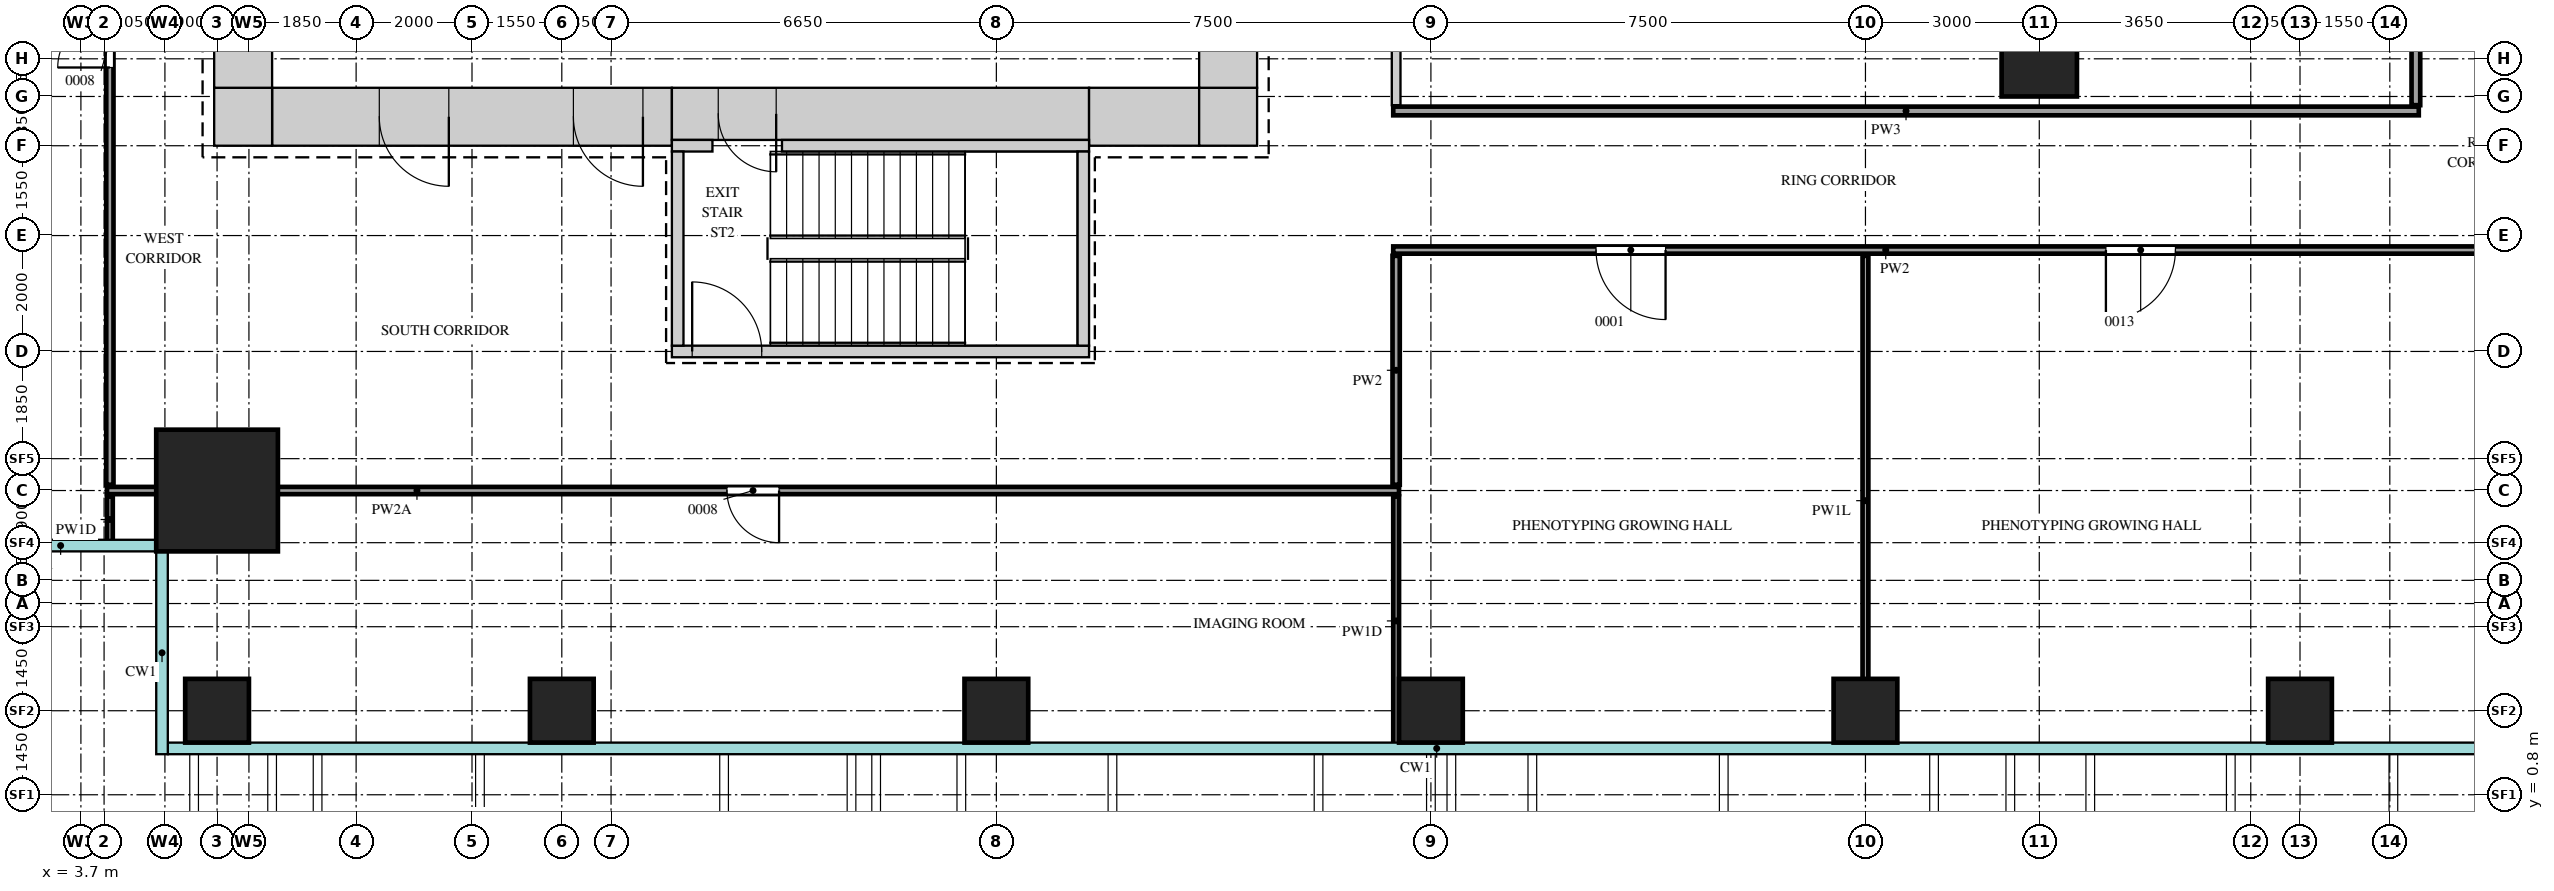
"""IFC4 building model, lengths in metres.
Left out: names, types, materials, properties, quantities, classifications, styles, units other than length and angle.
Written with IfcOpenShell. Run it as: python <this file> out.ifc"""

import sys

from ifc_helpers import new_model, si_unit, direction, frame, frame_2d, origin, origin_2d, place, context, subcontext, project, spatial, rectangle, extrude, source, transform, mapped, element, fill, save


model = new_model("IFC4")
c1 = context("Model", 3, precision=1e-05, world=origin(), true_north=direction((0.0, 1.0)))
c2 = subcontext(c1, "Body", "Model", "MODEL_VIEW")
j1 = project(units=[si_unit("LENGTHUNIT", "METRE"), si_unit("PLANEANGLEUNIT", "RADIAN")], contexts=[c1])
p1 = place(None, origin())
s1 = spatial("IfcSite", under=j1, at=p1, CompositionType="ELEMENT")
p2 = place(p1, origin())
s2 = spatial("IfcBuilding", under=s1, at=p2, CompositionType="ELEMENT")
p3 = place(p2, frame((0.0, 0.0, 127.9)))
s3 = spatial("IfcBuildingStorey", under=s2, at=p3, CompositionType="ELEMENT", Elevation=127.9)
m1 = source(origin(), c2, "Body", "SweptSolid", [
    extrude(rectangle(XDim=6.9, YDim=1.0, at=frame_2d((3.45, 0.0))), origin(), (0.0, 0.0, 1.0), 4.1),
])
p4 = place(p3, frame((7.0, 12.5, 0.0), z_axis=(0.0, 0.0, 1.0), x_axis=(1.0, 0.0, 0.0)))
e1 = element("IfcWall", 1, at=p4, inside=s3, PredefinedType="SHEAR", context=c2, shape_type="MappedRepresentation", body=[
    mapped(m1, transform((0.0, 0.0, 0.0))),
])
m2 = source(origin(), c2, "Body", "SweptSolid", [
    extrude(rectangle(XDim=1.2, YDim=2.1, at=frame_2d((0.6, 1.05))), frame((0.0, 0.51, 0.0), z_axis=(0.0, -1.0, 0.0), x_axis=(1.0, 0.0, 0.0)), (0.0, 0.0, 1.0), 1.02),
])
p5 = place(p4, frame((5.2, 0.0, 0.0)))
e2 = element("IfcOpeningElement", 2, at=p5, cuts=e1, PredefinedType="OPENING", context=c2, shape_type="MappedRepresentation", body=[
    mapped(m2, transform((0.0, 0.0, 0.0))),
])
p6 = place(p4, frame((1.85, 0.0, 0.0)))
e3 = element("IfcOpeningElement", 3, at=p6, cuts=e1, PredefinedType="OPENING", context=c2, shape_type="MappedRepresentation", body=[
    mapped(m2, transform((0.0, 0.0, 0.0))),
])
m3 = source(origin(), c2, "Body", "SweptSolid", [
    extrude(rectangle(XDim=7.2, YDim=0.9, at=frame_2d((3.6, 0.0))), origin(), (0.0, 0.0, 1.0), 4.1),
])
p7 = place(p3, frame((13.9, 12.55, 0.0), z_axis=(0.0, 0.0, 1.0), x_axis=(1.0, 0.0, 0.0)))
e4 = element("IfcWall", 4, at=p7, inside=s3, PredefinedType="SHEAR", context=c2, shape_type="MappedRepresentation", body=[
    mapped(m3, transform((0.0, 0.0, 0.0))),
])
m4 = source(origin(), c2, "Body", "SweptSolid", [
    extrude(rectangle(XDim=1.0, YDim=2.1, at=frame_2d((0.5, 1.05))), frame((0.0, 0.46, 0.0), z_axis=(0.0, -1.0, 0.0), x_axis=(1.0, 0.0, 0.0)), (0.0, 0.0, 1.0), 0.92),
])
p8 = place(p7, frame((0.8, 0.0, 0.0)))
e5 = element("IfcOpeningElement", 5, at=p8, cuts=e4, PredefinedType="OPENING", context=c2, shape_type="MappedRepresentation", body=[
    mapped(m4, transform((0.0, 0.0, 0.0))),
])
m5 = source(origin(), c2, "Body", "SweptSolid", [
    extrude(rectangle(XDim=1.9, YDim=1.0, at=frame_2d((0.95, 0.0))), origin(), (0.0, 0.0, 1.0), 4.1),
])
p9 = place(p3, frame((21.1, 12.5, 0.0), z_axis=(0.0, 0.0, 1.0), x_axis=(1.0, 0.0, 0.0)))
e6 = element("IfcWall", 6, at=p9, inside=s3, PredefinedType="SHEAR", context=c2, shape_type="MappedRepresentation", body=[
    mapped(m5, transform((0.0, 0.0, 0.0))),
])
m6 = source(origin(), c2, "Body", "SweptSolid", [
    extrude(rectangle(XDim=1.0, YDim=1.0, at=frame_2d((0.5, 0.0))), origin(), (0.0, 0.0, 1.0), 4.1),
])
for number, where, z_axis, x_axis in (
    (7, (23.0, 12.5, 0.0), (0.0, 0.0, 1.0), (1.0, 0.0, 0.0)),
    (8, (6.0, 12.5, 0.0), (0.0, 0.0, 1.0), (1.0, 0.0, 0.0)),
):
    element("IfcWall", number, at=place(p3, frame(where, z_axis=z_axis, x_axis=x_axis)), inside=s3, PredefinedType="SHEAR", context=c2, shape_type="MappedRepresentation", body=[
        mapped(m6, transform((0.0, 0.0, 0.0))),
    ])
m7 = source(origin(), c2, "Body", "SweptSolid", [
    extrude(rectangle(XDim=28.0, YDim=1.0, at=frame_2d((14.0, 0.0))), origin(), (0.0, 0.0, 1.0), 4.1),
])
p10 = place(p3, frame((23.5, 13.0, 0.0), z_axis=(0.0, 0.0, 1.0), x_axis=(0.0, 1.0, 0.0)))
e9 = element("IfcWall", 9, at=p10, inside=s3, PredefinedType="SHEAR", context=c2, shape_type="MappedRepresentation", body=[
    mapped(m7, transform((0.0, 0.0, 0.0))),
])
m8 = source(origin(), c2, "Body", "SweptSolid", [
    extrude(rectangle(XDim=1.8, YDim=2.1, at=frame_2d((0.9, 1.05))), frame((0.0, 0.51, 0.0), z_axis=(0.0, -1.0, 0.0), x_axis=(1.0, 0.0, 0.0)), (0.0, 0.0, 1.0), 1.02),
])
p11 = place(p10, frame((22.6, 0.0, 0.0)))
e10 = element("IfcOpeningElement", 10, at=p11, cuts=e9, PredefinedType="OPENING", context=c2, shape_type="MappedRepresentation", body=[
    mapped(m8, transform((0.0, 0.0, 0.0))),
])
p12 = place(p10, frame((15.35, 0.0, 0.0)))
e11 = element("IfcOpeningElement", 11, at=p12, cuts=e9, PredefinedType="OPENING", context=c2, shape_type="MappedRepresentation", body=[
    mapped(m2, transform((0.0, 0.0, 0.0))),
])
m9 = source(origin(), c2, "Body", "SweptSolid", [
    extrude(rectangle(XDim=0.9, YDim=2.1, at=frame_2d((0.45, 1.05))), frame((0.0, 0.51, 0.0), z_axis=(0.0, -1.0, 0.0), x_axis=(1.0, 0.0, 0.0)), (0.0, 0.0, 1.0), 1.02),
])
p13 = place(p10, frame((1.35, 0.0, 0.0)))
e12 = element("IfcOpeningElement", 12, at=p13, cuts=e9, PredefinedType="OPENING", context=c2, shape_type="MappedRepresentation", body=[
    mapped(m9, transform((0.0, 0.0, 0.0))),
])
p14 = place(p10, frame((4.55, 0.0, 0.0)))
e13 = element("IfcOpeningElement", 13, at=p14, cuts=e9, PredefinedType="OPENING", context=c2, shape_type="MappedRepresentation", body=[
    mapped(m9, transform((0.0, 0.0, 0.0))),
])
p15 = place(p10, frame((7.8, 0.0, 0.0)))
e14 = element("IfcOpeningElement", 14, at=p15, cuts=e9, PredefinedType="OPENING", context=c2, shape_type="MappedRepresentation", body=[
    mapped(m9, transform((0.0, 0.0, 0.0))),
])
p16 = place(p3, frame((6.5, 13.0, 0.0), z_axis=(0.0, 0.0, 1.0), x_axis=(0.0, 1.0, 0.0)))
e15 = element("IfcWall", 15, at=p16, inside=s3, PredefinedType="SHEAR", context=c2, shape_type="MappedRepresentation", body=[
    mapped(m7, transform((0.0, 0.0, 0.0))),
])
m10 = source(origin(), c2, "Body", "SweptSolid", [
    extrude(rectangle(XDim=0.7, YDim=0.2, at=frame_2d((0.35, 0.0))), origin(), (0.0, 0.0, 1.0), 4.1),
])
p17 = place(p3, frame((13.9, 12.0, 0.0), z_axis=(0.0, 0.0, 1.0), x_axis=(1.0, 0.0, 0.0)))
e16 = element("IfcWall", 16, at=p17, inside=s3, PredefinedType="SHEAR", context=c2, shape_type="MappedRepresentation", body=[
    mapped(m10, transform((0.0, 0.0, 0.0))),
])
m11 = source(origin(), c2, "Body", "SweptSolid", [
    extrude(rectangle(XDim=5.3, YDim=0.2, at=frame_2d((2.65, 0.0))), origin(), (0.0, 0.0, 1.0), 4.1),
])
p18 = place(p3, frame((15.8, 12.0, 0.0), z_axis=(0.0, 0.0, 1.0), x_axis=(1.0, 0.0, 0.0)))
e17 = element("IfcWall", 17, at=p18, inside=s3, PredefinedType="SHEAR", context=c2, shape_type="MappedRepresentation", body=[
    mapped(m11, transform((0.0, 0.0, 0.0))),
])
m12 = source(origin(), c2, "Body", "SweptSolid", [
    extrude(rectangle(XDim=7.2, YDim=0.2, at=frame_2d((3.6, 0.0))), origin(), (0.0, 0.0, 1.0), 4.1),
])
p19 = place(p3, frame((13.9, 8.45, 0.0), z_axis=(0.0, 0.0, 1.0), x_axis=(1.0, 0.0, 0.0)))
e18 = element("IfcWall", 18, at=p19, inside=s3, PredefinedType="SHEAR", context=c2, shape_type="MappedRepresentation", body=[
    mapped(m12, transform((0.0, 0.0, 0.0))),
])
m13 = source(origin(), c2, "Body", "SweptSolid", [
    extrude(rectangle(XDim=1.2, YDim=2.1, at=frame_2d((0.6, 1.05))), frame((0.0, 0.11, 0.0), z_axis=(0.0, -1.0, 0.0), x_axis=(1.0, 0.0, 0.0)), (0.0, 0.0, 1.0), 0.22),
])
p20 = place(p19, frame((0.35, 0.0, 0.0)))
e19 = element("IfcOpeningElement", 19, at=p20, cuts=e18, PredefinedType="OPENING", context=c2, shape_type="MappedRepresentation", body=[
    mapped(m13, transform((0.0, 0.0, 0.0))),
])
m14 = source(origin(), c2, "Body", "SweptSolid", [
    extrude(rectangle(XDim=3.35, YDim=0.2, at=frame_2d((1.675, 0.0))), origin(), (0.0, 0.0, 1.0), 4.1),
])
for number, where, z_axis, x_axis in (
    (20, (21.0, 8.55, 0.0), (0.0, 0.0, 1.0), (0.0, 1.0, 0.0)),
    (21, (14.0, 8.55, 0.0), (0.0, 0.0, 1.0), (0.0, 1.0, 0.0)),
):
    element("IfcWall", number, at=place(p3, frame(where, z_axis=z_axis, x_axis=x_axis)), inside=s3, PredefinedType="SHEAR", context=c2, shape_type="MappedRepresentation", body=[
        mapped(m14, transform((0.0, 0.0, 0.0))),
    ])
m15 = source(origin(), c2, "Body", "SweptSolid", [
    extrude(rectangle(XDim=2.1, YDim=2.1, at=origin_2d()), origin(), (0.0, 0.0, 1.0), 4.4),
])
p21 = place(p3, frame((6.05, 6.05, 0.0), z_axis=(0.0, 0.0, 1.0), x_axis=(1.0, 0.0, 0.0)))
e22 = element("IfcColumn", 22, at=p21, inside=s3, PredefinedType="COLUMN", context=c2, shape_type="MappedRepresentation", body=[
    mapped(m15, transform((0.0, 0.0, 0.0))),
])
m16 = source(origin(), c2, "Body", "SweptSolid", [
    extrude(rectangle(XDim=1.1, YDim=1.1, at=origin_2d()), origin(), (0.0, 0.0, 1.0), 4.1),
])
for number, where, z_axis, x_axis in (
    (23, (6.05, 2.25, 0.0), (0.0, 0.0, 1.0), (1.0, 0.0, 0.0)),
    (24, (12.0, 2.25, 0.0), (0.0, 0.0, 1.0), (1.0, 0.0, 0.0)),
    (25, (19.5, 2.25, 0.0), (0.0, 0.0, 1.0), (1.0, 0.0, 0.0)),
    (26, (27.0, 2.25, 0.0), (0.0, 0.0, 1.0), (1.0, 0.0, 0.0)),
    (27, (34.5, 2.25, 0.0), (0.0, 0.0, 1.0), (1.0, 0.0, 0.0)),
    (28, (42.0, 2.25, 0.0), (0.0, 0.0, 1.0), (1.0, 0.0, 0.0)),
):
    element("IfcColumn", number, at=place(p3, frame(where, z_axis=z_axis, x_axis=x_axis)), inside=s3, PredefinedType="COLUMN", context=c2, shape_type="MappedRepresentation", body=[
        mapped(m16, transform((0.0, 0.0, 0.0))),
    ])
m17 = source(origin(), c2, "Body", "SweptSolid", [
    extrude(rectangle(XDim=1.3, YDim=1.3, at=origin_2d()), origin(), (0.0, 0.0, 1.0), 4.1),
])
p22 = place(p3, frame((37.5, 13.5, 0.0), z_axis=(0.0, 0.0, 1.0), x_axis=(1.0, 0.0, 0.0)))
e29 = element("IfcColumn", 29, at=p22, inside=s3, PredefinedType="COLUMN", context=c2, shape_type="MappedRepresentation", body=[
    mapped(m17, transform((0.0, 0.0, 0.0))),
])
m18 = source(origin(), c2, "Body", "SweptSolid", [
    extrude(rectangle(XDim=4.3, YDim=0.1, at=frame_2d((2.15, 0.0))), origin(), (0.0, 0.0, 1.0), 4.2),
])
p23 = place(p3, frame((26.4, 1.65, 0.0), z_axis=(0.0, 0.0, 1.0), x_axis=(0.0, 1.0, 0.0)))
e30 = element("IfcWall", 30, at=p23, inside=s3, PredefinedType="PARTITIONING", context=c2, shape_type="MappedRepresentation", body=[
    mapped(m18, transform((0.0, 0.0, 0.0))),
])
m19 = source(origin(), c2, "Body", "SweptSolid", [
    extrude(rectangle(XDim=8.45, YDim=0.1, at=frame_2d((4.225, 0.0))), origin(), (0.0, 0.0, 1.0), 3.6),
])
p24 = place(p3, frame((34.5, 1.65, 0.0), z_axis=(0.0, 0.0, 1.0), x_axis=(0.0, 1.0, 0.0)))
e31 = element("IfcWall", 31, at=p24, inside=s3, PredefinedType="PARTITIONING", context=c2, shape_type="MappedRepresentation", body=[
    mapped(m19, transform((0.0, 0.0, 0.0))),
])
m20 = source(origin(), c2, "Body", "SweptSolid", [
    extrude(rectangle(XDim=0.8, YDim=0.1, at=frame_2d((0.4, 0.0))), origin(), (0.0, 0.0, 1.0), 4.2),
])
p25 = place(p3, frame((4.2, 5.15, 0.0), z_axis=(0.0, 0.0, 1.0), x_axis=(0.0, 1.0, 0.0)))
e32 = element("IfcWall", 32, at=p25, inside=s3, PredefinedType="PARTITIONING", context=c2, shape_type="MappedRepresentation", body=[
    mapped(m20, transform((0.0, 0.0, 0.0))),
])
m21 = source(origin(), c2, "Body", "SweptSolid", [
    extrude(rectangle(XDim=22.3, YDim=0.125, at=frame_2d((11.15, 0.0))), origin(), (0.0, 0.0, 1.0), 3.55),
])
p26 = place(p3, frame((4.15, 6.05, 0.0), z_axis=(0.0, 0.0, 1.0), x_axis=(1.0, 0.0, 0.0)))
e33 = element("IfcWall", 33, at=p26, inside=s3, PredefinedType="PARTITIONING", context=c2, shape_type="MappedRepresentation", body=[
    mapped(m21, transform((0.0, 0.0, 0.0))),
])
m22 = source(origin(), c2, "Body", "SweptSolid", [
    extrude(rectangle(XDim=0.9, YDim=2.1, at=frame_2d((0.45, 1.05))), frame((0.0, 0.073, 0.0), z_axis=(0.0, -1.0, 0.0), x_axis=(1.0, 0.0, 0.0)), (0.0, 0.0, 1.0), 0.145),
])
p27 = place(p26, frame((10.7, 0.0, 0.0)))
e34 = element("IfcOpeningElement", 34, at=p27, cuts=e33, PredefinedType="OPENING", context=c2, shape_type="MappedRepresentation", body=[
    mapped(m22, transform((0.0, 0.0, 0.0))),
])
m23 = source(origin(), c2, "Body", "SweptSolid", [
    extrude(rectangle(XDim=21.15, YDim=0.125, at=frame_2d((10.575, 0.0))), origin(), (0.0, 0.0, 1.0), 4.2),
])
p28 = place(p3, frame((4.2, 6.15, 0.0), z_axis=(0.0, 0.0, 1.0), x_axis=(0.0, 1.0, 0.0)))
e35 = element("IfcWall", 35, at=p28, inside=s3, PredefinedType="PARTITIONING", context=c2, shape_type="MappedRepresentation", body=[
    mapped(m23, transform((0.0, 0.0, 0.0))),
])
p29 = place(p28, frame((7.2, 0.0, 0.0)))
e36 = element("IfcOpeningElement", 36, at=p29, cuts=e35, PredefinedType="OPENING", context=c2, shape_type="MappedRepresentation", body=[
    mapped(m22, transform((0.0, 0.0, 0.0))),
])
p30 = place(p28, frame((16.8, 0.0, 0.0)))
e37 = element("IfcOpeningElement", 37, at=p30, cuts=e35, PredefinedType="OPENING", context=c2, shape_type="MappedRepresentation", body=[
    mapped(m22, transform((0.0, 0.0, 0.0))),
])
m24 = source(origin(), c2, "Body", "SweptSolid", [
    extrude(rectangle(XDim=3.95, YDim=0.125, at=frame_2d((1.975, 0.0))), origin(), (0.0, 0.0, 1.0), 4.2),
])
p31 = place(p3, frame((26.4, 6.15, 0.0), z_axis=(0.0, 0.0, 1.0), x_axis=(0.0, 1.0, 0.0)))
e38 = element("IfcWall", 38, at=p31, inside=s3, PredefinedType="PARTITIONING", context=c2, shape_type="MappedRepresentation", body=[
    mapped(m24, transform((0.0, 0.0, 0.0))),
])
m25 = source(origin(), c2, "Body", "SweptSolid", [
    extrude(rectangle(XDim=20.0, YDim=0.125, at=frame_2d((10.0, 0.0))), origin(), (0.0, 0.0, 1.0), 4.2),
])
p32 = place(p3, frame((26.35, 10.2, 0.0), z_axis=(0.0, 0.0, 1.0), x_axis=(1.0, 0.0, 0.0)))
e39 = element("IfcWall", 39, at=p32, inside=s3, PredefinedType="PARTITIONING", context=c2, shape_type="MappedRepresentation", body=[
    mapped(m25, transform((0.0, 0.0, 0.0))),
])
m26 = source(origin(), c2, "Body", "SweptSolid", [
    extrude(rectangle(XDim=1.2, YDim=2.1, at=frame_2d((0.6, 1.05))), frame((0.0, 0.073, 0.0), z_axis=(0.0, -1.0, 0.0), x_axis=(1.0, 0.0, 0.0)), (0.0, 0.0, 1.0), 0.145),
])
p33 = place(p32, frame((3.5, 0.0, 0.0)))
e40 = element("IfcOpeningElement", 40, at=p33, cuts=e39, PredefinedType="OPENING", context=c2, shape_type="MappedRepresentation", body=[
    mapped(m26, transform((0.0, 0.0, 0.0))),
])
p34 = place(p32, frame((12.3, 0.0, 0.0)))
e41 = element("IfcOpeningElement", 41, at=p34, cuts=e39, PredefinedType="OPENING", context=c2, shape_type="MappedRepresentation", body=[
    mapped(m26, transform((0.0, 0.0, 0.0))),
])
m27 = source(origin(), c2, "Body", "SweptSolid", [
    extrude(rectangle(XDim=17.7, YDim=0.15, at=frame_2d((8.85, 0.0))), origin(), (0.0, 0.0, 1.0), 4.2),
])
p35 = place(p3, frame((26.35, 12.6, 0.0), z_axis=(0.0, 0.0, 1.0), x_axis=(1.0, 0.0, 0.0)))
e42 = element("IfcWall", 42, at=p35, inside=s3, PredefinedType="PARTITIONING", context=c2, shape_type="MappedRepresentation", body=[
    mapped(m27, transform((0.0, 0.0, 0.0))),
])
m28 = source(origin(), c2, "Body", "SweptSolid", [
    extrude(rectangle(XDim=5.2, YDim=0.15, at=frame_2d((2.6, 0.0))), origin(), (0.0, 0.0, 1.0), 4.2),
])
p36 = place(p3, frame((26.4, 12.7, 0.0), z_axis=(0.0, 0.0, 1.0), x_axis=(0.0, 1.0, 0.0)))
e43 = element("IfcWall", 43, at=p36, inside=s3, PredefinedType="PARTITIONING", context=c2, shape_type="MappedRepresentation", body=[
    mapped(m28, transform((0.0, 0.0, 0.0))),
])
m29 = source(origin(), c2, "Body", "SweptSolid", [
    extrude(rectangle(XDim=0.9, YDim=2.1, at=frame_2d((0.45, 1.05))), frame((0.0, 0.085, 0.0), z_axis=(0.0, -1.0, 0.0), x_axis=(1.0, 0.0, 0.0)), (0.0, 0.0, 1.0), 0.17),
])
p37 = place(p36, frame((2.15, 0.0, 0.0)))
e44 = element("IfcOpeningElement", 44, at=p37, cuts=e43, PredefinedType="OPENING", context=c2, shape_type="MappedRepresentation", body=[
    mapped(m29, transform((0.0, 0.0, 0.0))),
])
p38 = place(p3, frame((44.0, 12.7, 0.0), z_axis=(0.0, 0.0, 1.0), x_axis=(0.0, 1.0, 0.0)))
e45 = element("IfcWall", 45, at=p38, inside=s3, PredefinedType="PARTITIONING", context=c2, shape_type="MappedRepresentation", body=[
    mapped(m28, transform((0.0, 0.0, 0.0))),
])
m30 = source(origin(), c2, "Body", "SweptSolid", [
    extrude(rectangle(XDim=1.2, YDim=2.1, at=frame_2d((0.6, 1.05))), frame((0.0, 0.45, 0.0), z_axis=(0.0, -1.0, 0.0), x_axis=(1.0, 0.0, 0.0)), (0.0, 0.0, 1.0), 0.9),
])
p39 = place(p5, origin())
e46 = element("IfcDoor", 46, at=p39, inside=s3, OperationType="SINGLE_SWING_RIGHT", PredefinedType="DOOR", context=c2, shape_type="MappedRepresentation", body=[
    mapped(m30, transform((0.0, 0.0, 0.0))),
])
fill(e2, e46)
p40 = place(p6, origin())
e47 = element("IfcDoor", 47, at=p40, inside=s3, OperationType="SINGLE_SWING_RIGHT", PredefinedType="DOOR", context=c2, shape_type="MappedRepresentation", body=[
    mapped(m30, transform((0.0, 0.0, 0.0))),
])
fill(e3, e47)
m31 = source(origin(), c2, "Body", "SweptSolid", [
    extrude(rectangle(XDim=1.0, YDim=2.1, at=frame_2d((0.5, 1.05))), frame((0.0, 0.4, 0.0), z_axis=(0.0, -1.0, 0.0), x_axis=(1.0, 0.0, 0.0)), (0.0, 0.0, 1.0), 0.8),
])
p41 = place(p8, origin())
e48 = element("IfcDoor", 48, at=p41, inside=s3, OperationType="SINGLE_SWING_RIGHT", PredefinedType="DOOR", context=c2, shape_type="MappedRepresentation", body=[
    mapped(m31, transform((0.0, 0.0, 0.0))),
])
fill(e5, e48)
m32 = source(origin(), c2, "Body", "SweptSolid", [
    extrude(rectangle(XDim=1.2, YDim=2.1, at=frame_2d((0.6, 1.05))), frame((0.0, 0.025, 0.0), z_axis=(0.0, -1.0, 0.0), x_axis=(1.0, 0.0, 0.0)), (0.0, 0.0, 1.0), 0.05),
])
p42 = place(p33, origin())
e49 = element("IfcDoor", 49, at=p42, inside=s3, OperationType="SINGLE_SWING_RIGHT", PredefinedType="DOOR", context=c2, shape_type="MappedRepresentation", body=[
    mapped(m32, transform((0.0, 0.0, 0.0))),
])
fill(e40, e49)
p43 = place(p34, origin())
e50 = element("IfcDoor", 50, at=p43, inside=s3, OperationType="SINGLE_SWING_LEFT", PredefinedType="DOOR", context=c2, shape_type="MappedRepresentation", body=[
    mapped(m32, transform((0.0, 0.0, 0.0))),
])
fill(e41, e50)
m33 = source(origin(), c2, "Body", "SweptSolid", [
    extrude(rectangle(XDim=0.9, YDim=2.1, at=frame_2d((0.45, 1.05))), frame((0.0, 0.025, 0.0), z_axis=(0.0, -1.0, 0.0), x_axis=(1.0, 0.0, 0.0)), (0.0, 0.0, 1.0), 0.05),
])
p44 = place(p27, origin())
e51 = element("IfcDoor", 51, at=p44, inside=s3, OperationType="SINGLE_SWING_RIGHT", PredefinedType="DOOR", context=c2, shape_type="MappedRepresentation", body=[
    mapped(m33, transform((0.0, 0.0, 0.0))),
])
fill(e34, e51)
p45 = place(p29, origin())
e52 = element("IfcDoor", 52, at=p45, inside=s3, OperationType="SINGLE_SWING_RIGHT", PredefinedType="DOOR", context=c2, shape_type="MappedRepresentation", body=[
    mapped(m33, transform((0.0, 0.0, 0.0))),
])
fill(e36, e52)
p46 = place(p20, origin())
e53 = element("IfcDoor", 53, at=p46, inside=s3, OperationType="SINGLE_SWING_RIGHT", PredefinedType="DOOR", context=c2, shape_type="MappedRepresentation", body=[
    mapped(m32, transform((0.0, 0.0, 0.0))),
])
fill(e19, e53)
save(model, sys.argv[1])
